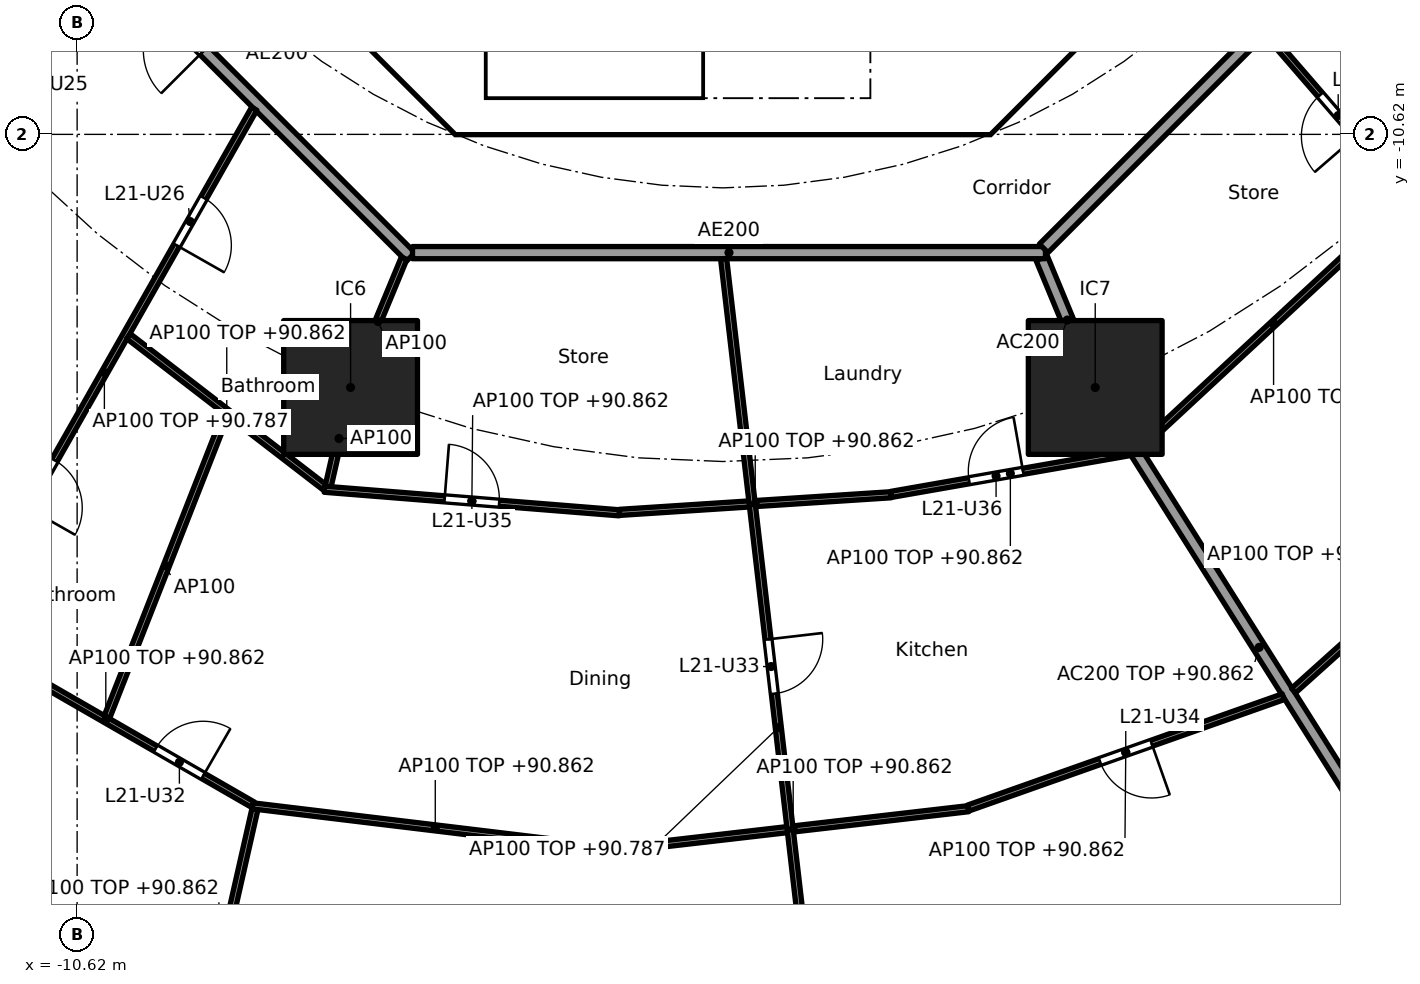
"""IFC4 building model, lengths in metres.
Left out: names, types, materials, properties, quantities, classifications, styles, units other than length and angle.
Written with IfcOpenShell. Run it as: python <this file> out.ifc"""

import sys

from ifc_helpers import new_model, si_unit, direction, frame, frame_2d, origin, origin_2d, place, context, subcontext, project, spatial, polyline, rectangle, outline, extrude, element, fill, save


model = new_model("IFC4")
c1 = context("Model", 3, precision=1e-05, world=origin(), true_north=direction((0.0, 1.0)))
c2 = subcontext(c1, "Body", "Model", "MODEL_VIEW")
j1 = project(units=[si_unit("LENGTHUNIT", "METRE"), si_unit("PLANEANGLEUNIT", "RADIAN")], contexts=[c1])
p1 = place(None, origin())
s1 = spatial("IfcSite", under=j1, at=p1, CompositionType="ELEMENT")
p2 = place(p1, origin())
s2 = spatial("IfcBuilding", under=s1, at=p2, CompositionType="ELEMENT")
p3 = place(p2, frame((0.0, 0.0, 88.1)))
s3 = spatial("IfcBuildingStorey", under=s2, at=p3, CompositionType="ELEMENT", Elevation=88.1)
for number, where, z_axis, x_axis in (
    (1, (-6.123, -14.782, 0.0), (0.0, 0.0, 1.0), (1.0, 0.0, 0.0)),
    (2, (6.123, -14.782, 0.0), (0.0, 0.0, 1.0), (1.0, 0.0, 0.0)),
):
    element("IfcColumn", number, at=place(p3, frame(where, z_axis=z_axis, x_axis=x_axis)), inside=s3, PredefinedType="COLUMN", context=c2, shape_type="SweptSolid", body=[
        extrude(rectangle(XDim=2.2, YDim=2.2, at=origin_2d()), origin(), (0.0, 0.0, 1.0), 3.7),
    ])
p4 = place(p3, frame((-9.988, -4.613, 0.0), z_axis=(0.0, 0.0, 1.0), x_axis=(0.707106781187, -0.707106781187, 0.0)))
e3 = element("IfcWall", 3, at=p4, inside=s3, PredefinedType="SHEAR", context=c2, shape_type="SweptSolid", body=[
    extrude(rectangle(XDim=7.602, YDim=0.6, at=frame_2d((3.801, 0.0))), origin(), (0.0, 0.0, 1.0), 3.44),
])
p5 = place(p4, frame((6.151, 0.0, 0.0)))
e4 = element("IfcOpeningElement", 4, at=p5, cuts=e3, PredefinedType="OPENING", context=c2, shape_type="SweptSolid", body=[
    extrude(rectangle(XDim=1.1, YDim=2.1, at=frame_2d((0.55, 1.05))), frame((0.0, 0.31, 0.0), z_axis=(0.0, -1.0, 0.0), x_axis=(1.0, 0.0, 0.0)), (0.0, 0.0, 1.0), 0.62),
])
p6 = place(p3, frame((4.613, -9.988, 0.0), z_axis=(0.0, 0.0, 1.0), x_axis=(0.707106781187, 0.707106781187, 0.0)))
e5 = element("IfcWall", 5, at=p6, inside=s3, PredefinedType="SHEAR", context=c2, shape_type="SweptSolid", body=[
    extrude(rectangle(XDim=7.602, YDim=0.6, at=frame_2d((3.801, 0.0))), origin(), (0.0, 0.0, 1.0), 3.44),
])
p7 = place(p6, frame((3.201, 0.0, 0.0)))
e6 = element("IfcOpeningElement", 6, at=p7, cuts=e5, PredefinedType="OPENING", context=c2, shape_type="SweptSolid", body=[
    extrude(rectangle(XDim=1.2, YDim=2.1, at=frame_2d((0.6, 1.05))), frame((0.0, 0.31, 0.0), z_axis=(0.0, -1.0, 0.0), x_axis=(1.0, 0.0, 0.0)), (0.0, 0.0, 1.0), 0.62),
])
p8 = place(p3, frame((4.0, -10.025, 0.0), z_axis=(0.0, 0.0, 1.0), x_axis=(0.0, 1.0, 0.0)))
e7 = element("IfcWall", 7, at=p8, inside=s3, PredefinedType="SOLIDWALL", context=c2, shape_type="SweptSolid", body=[
    extrude(rectangle(XDim=3.0, YDim=0.2, at=frame_2d((1.5, 0.0))), origin(), (0.0, 0.0, 1.0), 3.44),
])
p9 = place(p8, frame((0.975, 0.0, 0.0)))
e8 = element("IfcOpeningElement", 8, at=p9, cuts=e7, PredefinedType="OPENING", context=c2, shape_type="SweptSolid", body=[
    extrude(rectangle(XDim=1.1, YDim=2.1, at=frame_2d((0.55, 1.05))), frame((0.0, 0.11, 0.0), z_axis=(0.0, -1.0, 0.0), x_axis=(1.0, 0.0, 0.0)), (0.0, 0.0, 1.0), 0.22),
])
p10 = place(p3, origin())
e9 = element("IfcWall", 9, at=p10, inside=s3, PredefinedType="SHEAR", context=c2, shape_type="SweptSolid", body=[
    extrude(outline(polyline([(-4.152, -10.025), (4.152, -10.025), (4.401, -9.776), (4.825, -10.2), (4.401, -10.625), (-4.401, -10.625), (-4.825, -10.2), (-4.401, -9.776), (-4.152, -10.025)])), origin(), (0.0, 0.0, 1.0), 3.44),
])
p11 = place(p3, origin())
e10 = element("IfcWall", 10, at=p11, inside=s3, PredefinedType="SOLIDWALL", context=c2, shape_type="SweptSolid", body=[
    extrude(outline(polyline([(-3.9, -10.025), (-4.1, -10.025), (-4.1, -7.025), (-3.9, -7.025), (-3.9, -10.025)])), origin(), (0.0, 0.0, 1.0), 3.44),
])
p12 = place(p3, frame((5.243, -12.657, 0.0), z_axis=(0.0, 0.0, 1.0), x_axis=(0.382747093259, -0.923853160736, 0.0)))
e11 = element("IfcWall", 11, at=p12, inside=s3, PredefinedType="PARTITIONING", context=c2, shape_type="SweptSolid", body=[
    extrude(rectangle(XDim=2.2, YDim=0.2, at=frame_2d((1.1, 0.0))), origin(), (0.0, 0.0, 1.0), 3.44),
])
p13 = place(p3, frame((6.15, -14.824, 0.0), z_axis=(0.0, 0.0, 1.0), x_axis=(0.533492589682, -0.845804739142, 0.0)))
e12 = element("IfcWall", 12, at=p13, inside=s3, PredefinedType="PARTITIONING", context=c2, shape_type="SweptSolid", body=[
    extrude(rectangle(XDim=10.006, YDim=0.2, at=frame_2d((5.003, 0.0))), origin(), (0.0, 0.0, 1.0), 2.762),
])
p14 = place(p3, frame((-12.635, -5.134, 0.0), z_axis=(0.0, 0.0, 1.0), x_axis=(0.707106781187, -0.707106781187, 0.0)))
e13 = element("IfcWall", 13, at=p14, inside=s3, PredefinedType="PARTITIONING", context=c2, shape_type="SweptSolid", body=[
    extrude(rectangle(XDim=10.609, YDim=0.2, at=frame_2d((5.305, 0.0))), origin(), (0.0, 0.0, 1.0), 3.44),
])
p15 = place(p14, frame((4.804, 0.0, 0.0)))
e14 = element("IfcOpeningElement", 14, at=p15, cuts=e13, PredefinedType="OPENING", context=c2, shape_type="SweptSolid", body=[
    extrude(rectangle(XDim=1.0, YDim=2.1, at=frame_2d((0.5, 1.05))), frame((0.0, 0.11, 0.0), z_axis=(0.0, -1.0, 0.0), x_axis=(1.0, 0.0, 0.0)), (0.0, 0.0, 1.0), 0.22),
])
p16 = place(p3, frame((-5.104, -12.565, 0.0), z_axis=(0.0, 0.0, 1.0), x_axis=(1.0, 0.0, 0.0)))
e15 = element("IfcWall", 15, at=p16, inside=s3, PredefinedType="PARTITIONING", context=c2, shape_type="SweptSolid", body=[
    extrude(rectangle(XDim=10.409, YDim=0.2, at=frame_2d((5.205, 0.0))), origin(), (0.0, 0.0, 1.0), 3.44),
])
p17 = place(p3, frame((5.275, -12.494, 0.0), z_axis=(0.0, 0.0, 1.0), x_axis=(0.707106781187, 0.707106781187, 0.0)))
e16 = element("IfcWall", 16, at=p17, inside=s3, PredefinedType="PARTITIONING", context=c2, shape_type="SweptSolid", body=[
    extrude(rectangle(XDim=10.409, YDim=0.2, at=frame_2d((5.205, 0.0))), origin(), (0.0, 0.0, 1.0), 3.44),
])
p18 = place(p17, frame((5.906, 0.0, 0.0)))
e17 = element("IfcOpeningElement", 17, at=p18, cuts=e16, PredefinedType="OPENING", context=c2, shape_type="SweptSolid", body=[
    extrude(rectangle(XDim=1.0, YDim=2.1, at=frame_2d((0.5, 1.05))), frame((0.0, 0.11, 0.0), z_axis=(0.0, -1.0, 0.0), x_axis=(1.0, 0.0, 0.0)), (0.0, 0.0, 1.0), 0.22),
])
p19 = place(p3, frame((-10.181, -7.729, 0.0), z_axis=(0.0, 0.0, 1.0), x_axis=(-0.699708106083, -0.714428839201, 0.0)))
e18 = element("IfcWall", 18, at=p19, inside=s3, PredefinedType="PARTITIONING", context=c2, shape_type="SweptSolid", body=[
    extrude(rectangle(XDim=14.959, YDim=0.1, at=frame_2d((7.48, 0.0))), origin(), (0.0, 0.0, 1.0), 2.687),
])
p20 = place(p19, frame((1.675, 0.0, 0.0)))
e19 = element("IfcOpeningElement", 19, at=p20, cuts=e18, PredefinedType="OPENING", context=c2, shape_type="SweptSolid", body=[
    extrude(rectangle(XDim=0.9, YDim=2.1, at=frame_2d((0.45, 1.05))), frame((0.0, 0.06, 0.0), z_axis=(0.0, -1.0, 0.0), x_axis=(1.0, 0.0, 0.0)), (0.0, 0.0, 1.0), 0.12),
])
p21 = place(p19, frame((6.619, 0.0, 0.0)))
e20 = element("IfcOpeningElement", 20, at=p21, cuts=e18, PredefinedType="OPENING", context=c2, shape_type="SweptSolid", body=[
    extrude(rectangle(XDim=0.9, YDim=2.1, at=frame_2d((0.45, 1.05))), frame((0.0, 0.06, 0.0), z_axis=(0.0, -1.0, 0.0), x_axis=(1.0, 0.0, 0.0)), (0.0, 0.0, 1.0), 0.12),
])
p22 = place(p3, frame((-7.707, -10.198, 0.0), z_axis=(0.0, 0.0, 1.0), x_axis=(-0.493963587489, -0.869482589955, 0.0)))
e21 = element("IfcWall", 21, at=p22, inside=s3, PredefinedType="PARTITIONING", context=c2, shape_type="SweptSolid", body=[
    extrude(rectangle(XDim=9.978, YDim=0.1, at=frame_2d((4.989, 0.0))), origin(), (0.0, 0.0, 1.0), 2.687),
])
p23 = place(p22, frame((1.684, 0.0, 0.0)))
e22 = element("IfcOpeningElement", 22, at=p23, cuts=e21, PredefinedType="OPENING", context=c2, shape_type="SweptSolid", body=[
    extrude(rectangle(XDim=0.9, YDim=2.1, at=frame_2d((0.45, 1.05))), frame((0.0, 0.06, 0.0), z_axis=(0.0, -1.0, 0.0), x_axis=(1.0, 0.0, 0.0)), (0.0, 0.0, 1.0), 0.12),
])
p24 = place(p22, frame((6.648, 0.0, 0.0)))
e23 = element("IfcOpeningElement", 23, at=p24, cuts=e21, PredefinedType="OPENING", context=c2, shape_type="SweptSolid", body=[
    extrude(rectangle(XDim=0.9, YDim=2.1, at=frame_2d((0.45, 1.05))), frame((0.0, 0.06, 0.0), z_axis=(0.0, -1.0, 0.0), x_axis=(1.0, 0.0, 0.0)), (0.0, 0.0, 1.0), 0.12),
])
p25 = place(p3, frame((-9.775, -13.939, 0.0), z_axis=(0.0, 0.0, 1.0), x_axis=(0.792156642473, -0.61031783014, 0.0)))
e24 = element("IfcWall", 24, at=p25, inside=s3, PredefinedType="PARTITIONING", context=c2, shape_type="SweptSolid", body=[
    extrude(rectangle(XDim=4.08, YDim=0.1, at=frame_2d((2.04, 0.0))), origin(), (0.0, 0.0, 1.0), 2.762),
])
p26 = place(p3, frame((-12.568, -18.856, 0.0), z_axis=(0.0, 0.0, 1.0), x_axis=(0.866532513598, -0.499120629585, 0.0)))
e25 = element("IfcWall", 25, at=p26, inside=s3, PredefinedType="PARTITIONING", context=c2, shape_type="SweptSolid", body=[
    extrude(rectangle(XDim=5.585, YDim=0.1, at=frame_2d((2.792, 0.0))), origin(), (0.0, 0.0, 1.0), 2.762),
])
p27 = place(p26, frame((3.739, 0.0, 0.0)))
e26 = element("IfcOpeningElement", 26, at=p27, cuts=e25, PredefinedType="OPENING", context=c2, shape_type="SweptSolid", body=[
    extrude(rectangle(XDim=0.9, YDim=2.1, at=frame_2d((0.45, 1.05))), frame((0.0, 0.06, 0.0), z_axis=(0.0, -1.0, 0.0), x_axis=(1.0, 0.0, 0.0)), (0.0, 0.0, 1.0), 0.12),
])
p28 = place(p3, frame((-8.177, -15.231, 0.0), z_axis=(0.0, 0.0, 1.0), x_axis=(-0.365520869553, -0.930803144559, 0.0)))
e27 = element("IfcWall", 27, at=p28, inside=s3, PredefinedType="PARTITIONING", context=c2, shape_type="SweptSolid", body=[
    extrude(rectangle(XDim=5.342, YDim=0.1, at=frame_2d((2.671, 0.0))), origin(), (0.0, 0.0, 1.0), 3.44),
])
p29 = place(p3, frame((-5.243, -12.657, 0.0), z_axis=(0.0, 0.0, 1.0), x_axis=(-0.382719158442, -0.923864733477, 0.0)))
e28 = element("IfcWall", 28, at=p29, inside=s3, PredefinedType="PARTITIONING", context=c2, shape_type="SweptSolid", body=[
    extrude(rectangle(XDim=2.25, YDim=0.1, at=frame_2d((1.125, 0.0))), origin(), (0.0, 0.0, 1.0), 3.44),
])
p30 = place(p3, frame((-6.134, -14.831, 0.0), z_axis=(0.0, 0.0, 1.0), x_axis=(-0.221269290858, -0.975212746493, 0.0)))
e29 = element("IfcWall", 29, at=p30, inside=s3, PredefinedType="PARTITIONING", context=c2, shape_type="SweptSolid", body=[
    extrude(rectangle(XDim=1.62, YDim=0.1, at=frame_2d((0.81, 0.0))), origin(), (0.0, 0.0, 1.0), 3.44),
])
p31 = place(p3, frame((-6.553, -16.456, 0.0), z_axis=(0.0, 0.0, 1.0), x_axis=(0.996817033118, -0.079723286975, 0.0)))
e30 = element("IfcWall", 30, at=p31, inside=s3, PredefinedType="PARTITIONING", context=c2, shape_type="SweptSolid", body=[
    extrude(rectangle(XDim=4.866, YDim=0.1, at=frame_2d((2.433, 0.0))), origin(), (0.0, 0.0, 1.0), 2.762),
])
p32 = place(p31, frame((1.983, 0.0, 0.0)))
e31 = element("IfcOpeningElement", 31, at=p32, cuts=e30, PredefinedType="OPENING", context=c2, shape_type="SweptSolid", body=[
    extrude(rectangle(XDim=0.9, YDim=2.1, at=frame_2d((0.45, 1.05))), frame((0.0, 0.06, 0.0), z_axis=(0.0, -1.0, 0.0), x_axis=(1.0, 0.0, 0.0)), (0.0, 0.0, 1.0), 0.12),
])
p33 = place(p3, frame((-7.696, -21.717, 0.0), z_axis=(0.0, 0.0, 1.0), x_axis=(-0.221196717441, -0.97522921008, 0.0)))
e32 = element("IfcWall", 32, at=p33, inside=s3, PredefinedType="PARTITIONING", context=c2, shape_type="SweptSolid", body=[
    extrude(rectangle(XDim=4.7, YDim=0.1, at=frame_2d((2.35, 0.0))), origin(), (0.0, 0.0, 1.0), 2.762),
])
p34 = place(p33, frame((1.9, 0.0, 0.0)))
e33 = element("IfcOpeningElement", 33, at=p34, cuts=e32, PredefinedType="OPENING", context=c2, shape_type="SweptSolid", body=[
    extrude(rectangle(XDim=0.9, YDim=2.1, at=frame_2d((0.45, 1.05))), frame((0.0, 0.06, 0.0), z_axis=(0.0, -1.0, 0.0), x_axis=(1.0, 0.0, 0.0)), (0.0, 0.0, 1.0), 0.12),
])
p35 = place(p3, frame((-7.735, -21.662, 0.0), z_axis=(0.0, 0.0, 1.0), x_axis=(0.992808347289, -0.119714600421, 0.0)))
e34 = element("IfcWall", 34, at=p35, inside=s3, PredefinedType="PARTITIONING", context=c2, shape_type="SweptSolid", body=[
    extrude(rectangle(XDim=6.053, YDim=0.1, at=frame_2d((3.026, 0.0))), origin(), (0.0, 0.0, 1.0), 2.762),
])
p36 = place(p3, frame((-1.703, -16.836, 0.0), z_axis=(0.0, 0.0, 1.0), x_axis=(0.997899919101, 0.064774620473, 0.0)))
e35 = element("IfcWall", 35, at=p36, inside=s3, PredefinedType="PARTITIONING", context=c2, shape_type="SweptSolid", body=[
    extrude(rectangle(XDim=4.478, YDim=0.1, at=frame_2d((2.239, 0.0))), origin(), (0.0, 0.0, 1.0), 2.762),
])
p37 = place(p3, frame((-1.726, -22.375, 0.0), z_axis=(0.0, 0.0, 1.0), x_axis=(0.993392336919, 0.114767874207, 0.0)))
e36 = element("IfcWall", 36, at=p37, inside=s3, PredefinedType="PARTITIONING", context=c2, shape_type="SweptSolid", body=[
    extrude(rectangle(XDim=5.801, YDim=0.1, at=frame_2d((2.9, 0.0))), origin(), (0.0, 0.0, 1.0), 2.762),
])
p38 = place(p3, frame((0.011, -12.664, 0.0), z_axis=(0.0, 0.0, 1.0), x_axis=(0.115841404661, -0.993267722704, 0.0)))
e37 = element("IfcWall", 37, at=p38, inside=s3, PredefinedType="PARTITIONING", context=c2, shape_type="SweptSolid", body=[
    extrude(rectangle(XDim=15.528, YDim=0.1, at=frame_2d((7.764, 0.0))), origin(), (0.0, 0.0, 1.0), 2.687),
])
p39 = place(p38, frame((6.303, 0.0, 0.0)))
e38 = element("IfcOpeningElement", 38, at=p39, cuts=e37, PredefinedType="OPENING", context=c2, shape_type="SweptSolid", body=[
    extrude(rectangle(XDim=0.9, YDim=2.1, at=frame_2d((0.45, 1.05))), frame((0.0, 0.06, 0.0), z_axis=(0.0, -1.0, 0.0), x_axis=(1.0, 0.0, 0.0)), (0.0, 0.0, 1.0), 0.12),
])
p40 = place(p3, frame((2.765, -16.541, 0.0), z_axis=(0.0, 0.0, 1.0), x_axis=(0.984998714702, 0.172561676036, 0.0)))
e39 = element("IfcWall", 39, at=p40, inside=s3, PredefinedType="PARTITIONING", context=c2, shape_type="SweptSolid", body=[
    extrude(rectangle(XDim=3.984, YDim=0.1, at=frame_2d((1.992, 0.0))), origin(), (0.0, 0.0, 1.0), 2.762),
])
p41 = place(p40, frame((1.304, 0.0, 0.0)))
e40 = element("IfcOpeningElement", 40, at=p41, cuts=e39, PredefinedType="OPENING", context=c2, shape_type="SweptSolid", body=[
    extrude(rectangle(XDim=0.9, YDim=2.1, at=frame_2d((0.45, 1.05))), frame((0.0, 0.06, 0.0), z_axis=(0.0, -1.0, 0.0), x_axis=(1.0, 0.0, 0.0)), (0.0, 0.0, 1.0), 0.12),
])
p42 = place(p3, frame((4.034, -21.698, 0.0), z_axis=(0.0, 0.0, 1.0), x_axis=(0.942861482644, 0.33318497047, 0.0)))
e41 = element("IfcWall", 41, at=p42, inside=s3, PredefinedType="PARTITIONING", context=c2, shape_type="SweptSolid", body=[
    extrude(rectangle(XDim=5.495, YDim=0.1, at=frame_2d((2.748, 0.0))), origin(), (0.0, 0.0, 1.0), 2.762),
])
p43 = place(p42, frame((2.297, 0.0, 0.0)))
e42 = element("IfcOpeningElement", 42, at=p43, cuts=e41, PredefinedType="OPENING", context=c2, shape_type="SweptSolid", body=[
    extrude(rectangle(XDim=0.9, YDim=2.1, at=frame_2d((0.45, 1.05))), frame((0.0, 0.06, 0.0), z_axis=(0.0, -1.0, 0.0), x_axis=(1.0, 0.0, 0.0)), (0.0, 0.0, 1.0), 0.12),
])
p44 = place(p3, frame((6.861, -15.768, 0.0), z_axis=(0.0, 0.0, 1.0), x_axis=(0.733011256509, 0.680216508056, 0.0)))
e43 = element("IfcWall", 43, at=p44, inside=s3, PredefinedType="PARTITIONING", context=c2, shape_type="SweptSolid", body=[
    extrude(rectangle(XDim=5.989, YDim=0.1, at=frame_2d((2.994, 0.0))), origin(), (0.0, 0.0, 1.0), 2.762),
])
p45 = place(p3, frame((9.384, -19.768, 0.0), z_axis=(0.0, 0.0, 1.0), x_axis=(0.74387407395, 0.668319805262, 0.0)))
e44 = element("IfcWall", 44, at=p45, inside=s3, PredefinedType="PARTITIONING", context=c2, shape_type="SweptSolid", body=[
    extrude(rectangle(XDim=6.695, YDim=0.1, at=frame_2d((3.348, 0.0))), origin(), (0.0, 0.0, 1.0), 2.762),
])
p46 = place(p45, frame((2.898, 0.0, 0.0)))
e45 = element("IfcOpeningElement", 45, at=p46, cuts=e44, PredefinedType="OPENING", context=c2, shape_type="SweptSolid", body=[
    extrude(rectangle(XDim=0.9, YDim=2.1, at=frame_2d((0.45, 1.05))), frame((0.0, 0.06, 0.0), z_axis=(0.0, -1.0, 0.0), x_axis=(1.0, 0.0, 0.0)), (0.0, 0.0, 1.0), 0.12),
])
p47 = place(p3, frame((8.95, -8.96, 0.0), z_axis=(0.0, 0.0, 1.0), x_axis=(0.65441081073, -0.756139200676, 0.0)))
e46 = element("IfcWall", 46, at=p47, inside=s3, PredefinedType="PARTITIONING", context=c2, shape_type="SweptSolid", body=[
    extrude(rectangle(XDim=12.451, YDim=0.1, at=frame_2d((6.226, 0.0))), origin(), (0.0, 0.0, 1.0), 2.687),
])
p48 = place(p47, frame((1.336, 0.0, 0.0)))
e47 = element("IfcOpeningElement", 47, at=p48, cuts=e46, PredefinedType="OPENING", context=c2, shape_type="SweptSolid", body=[
    extrude(rectangle(XDim=0.9, YDim=2.1, at=frame_2d((0.45, 1.05))), frame((0.0, 0.06, 0.0), z_axis=(0.0, -1.0, 0.0), x_axis=(1.0, 0.0, 0.0)), (0.0, 0.0, 1.0), 0.12),
])
p49 = place(p47, frame((5.501, 0.0, 0.0)))
e48 = element("IfcOpeningElement", 48, at=p49, cuts=e46, PredefinedType="OPENING", context=c2, shape_type="SweptSolid", body=[
    extrude(rectangle(XDim=0.9, YDim=2.1, at=frame_2d((0.45, 1.05))), frame((0.0, 0.06, 0.0), z_axis=(0.0, -1.0, 0.0), x_axis=(1.0, 0.0, 0.0)), (0.0, 0.0, 1.0), 0.12),
])
p50 = place(p47, frame((9.941, 0.0, 0.0)))
e49 = element("IfcOpeningElement", 49, at=p50, cuts=e46, PredefinedType="OPENING", context=c2, shape_type="SweptSolid", body=[
    extrude(rectangle(XDim=0.9, YDim=2.1, at=frame_2d((0.45, 1.05))), frame((0.0, 0.06, 0.0), z_axis=(0.0, -1.0, 0.0), x_axis=(1.0, 0.0, 0.0)), (0.0, 0.0, 1.0), 0.12),
])
p51 = place(p5, origin())
e50 = element("IfcDoor", 50, at=p51, inside=s3, OperationType="SINGLE_SWING_LEFT", PredefinedType="DOOR", context=c2, shape_type="SweptSolid", body=[
    extrude(rectangle(XDim=1.1, YDim=2.1, at=frame_2d((0.55, 1.05))), frame((0.0, 0.025, 0.0), z_axis=(0.0, -1.0, 0.0), x_axis=(1.0, 0.0, 0.0)), (0.0, 0.0, 1.0), 0.05),
])
fill(e4, e50)
p52 = place(p23, origin())
e51 = element("IfcDoor", 51, at=p52, inside=s3, OperationType="SINGLE_SWING_RIGHT", PredefinedType="DOOR", context=c2, shape_type="SweptSolid", body=[
    extrude(rectangle(XDim=0.9, YDim=2.1, at=frame_2d((0.45, 1.05))), frame((0.0, 0.025, 0.0), z_axis=(0.0, -1.0, 0.0), x_axis=(1.0, 0.0, 0.0)), (0.0, 0.0, 1.0), 0.05),
])
fill(e22, e51)
p53 = place(p24, origin())
e52 = element("IfcDoor", 52, at=p53, inside=s3, OperationType="SINGLE_SWING_RIGHT", PredefinedType="DOOR", context=c2, shape_type="SweptSolid", body=[
    extrude(rectangle(XDim=0.9, YDim=2.1, at=frame_2d((0.45, 1.05))), frame((0.0, 0.025, 0.0), z_axis=(0.0, -1.0, 0.0), x_axis=(1.0, 0.0, 0.0)), (0.0, 0.0, 1.0), 0.05),
])
fill(e23, e52)
p54 = place(p27, origin())
e53 = element("IfcDoor", 53, at=p54, inside=s3, OperationType="SINGLE_SWING_RIGHT", PredefinedType="DOOR", context=c2, shape_type="SweptSolid", body=[
    extrude(rectangle(XDim=0.9, YDim=2.1, at=frame_2d((0.45, 1.05))), frame((0.0, 0.025, 0.0), z_axis=(0.0, -1.0, 0.0), x_axis=(1.0, 0.0, 0.0)), (0.0, 0.0, 1.0), 0.05),
])
fill(e26, e53)
p55 = place(p39, origin())
e54 = element("IfcDoor", 54, at=p55, inside=s3, OperationType="SINGLE_SWING_LEFT", PredefinedType="DOOR", context=c2, shape_type="SweptSolid", body=[
    extrude(rectangle(XDim=0.9, YDim=2.1, at=frame_2d((0.45, 1.05))), frame((0.0, 0.025, 0.0), z_axis=(0.0, -1.0, 0.0), x_axis=(1.0, 0.0, 0.0)), (0.0, 0.0, 1.0), 0.05),
])
fill(e38, e54)
p56 = place(p43, frame((0.9, 0.0, 0.0), x_axis=(-1.0, 0.0, 0.0)))
e55 = element("IfcDoor", 55, at=p56, inside=s3, OperationType="SINGLE_SWING_LEFT", PredefinedType="DOOR", context=c2, shape_type="SweptSolid", body=[
    extrude(rectangle(XDim=0.9, YDim=2.1, at=frame_2d((0.45, 1.05))), frame((0.0, 0.025, 0.0), z_axis=(0.0, -1.0, 0.0), x_axis=(1.0, 0.0, 0.0)), (0.0, 0.0, 1.0), 0.05),
])
fill(e42, e55)
p57 = place(p32, origin())
e56 = element("IfcDoor", 56, at=p57, inside=s3, OperationType="SINGLE_SWING_LEFT", PredefinedType="DOOR", context=c2, shape_type="SweptSolid", body=[
    extrude(rectangle(XDim=0.9, YDim=2.1, at=frame_2d((0.45, 1.05))), frame((0.0, 0.025, 0.0), z_axis=(0.0, -1.0, 0.0), x_axis=(1.0, 0.0, 0.0)), (0.0, 0.0, 1.0), 0.05),
])
fill(e31, e56)
p58 = place(p41, origin())
e57 = element("IfcDoor", 57, at=p58, inside=s3, OperationType="SINGLE_SWING_RIGHT", PredefinedType="DOOR", context=c2, shape_type="SweptSolid", body=[
    extrude(rectangle(XDim=0.9, YDim=2.1, at=frame_2d((0.45, 1.05))), frame((0.0, 0.025, 0.0), z_axis=(0.0, -1.0, 0.0), x_axis=(1.0, 0.0, 0.0)), (0.0, 0.0, 1.0), 0.05),
])
fill(e40, e57)
p59 = place(p48, frame((0.9, 0.0, 0.0), x_axis=(-1.0, 0.0, 0.0)))
e58 = element("IfcDoor", 58, at=p59, inside=s3, OperationType="SINGLE_SWING_LEFT", PredefinedType="DOOR", context=c2, shape_type="SweptSolid", body=[
    extrude(rectangle(XDim=0.9, YDim=2.1, at=frame_2d((0.45, 1.05))), frame((0.0, 0.025, 0.0), z_axis=(0.0, -1.0, 0.0), x_axis=(1.0, 0.0, 0.0)), (0.0, 0.0, 1.0), 0.05),
])
fill(e47, e58)
save(model, sys.argv[1])
